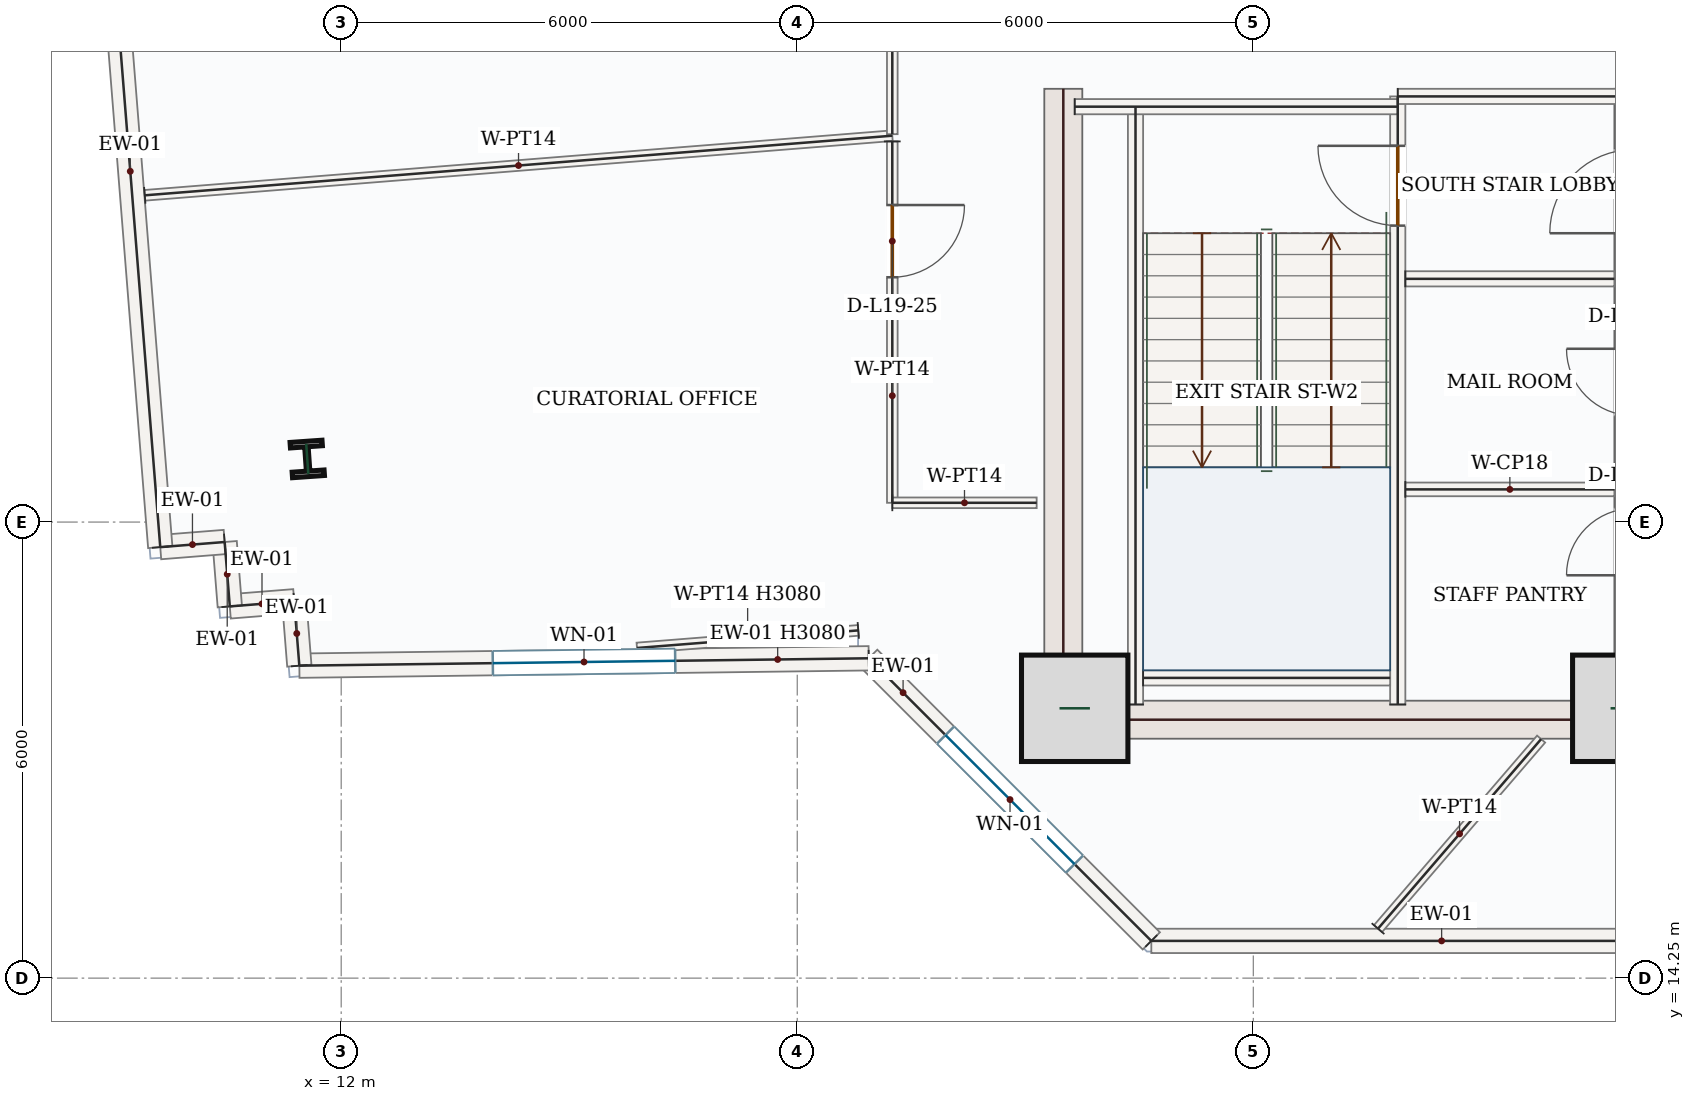
"""IFC4 building model, lengths in metres.
Left out: names, types, materials, properties, quantities, classifications, styles, units other than length and angle.
Written with IfcOpenShell. Run it as: python <this file> out.ifc"""

import sys

from ifc_helpers import new_model, si_unit, direction, frame, frame_2d, origin, origin_2d, place, context, subcontext, project, spatial, rectangle, i_section, extrude, source, transform, mapped, element, fill, save


model = new_model("IFC4")
c1 = context("Model", 3, precision=1e-05, world=origin(), true_north=direction((0.0, 1.0)))
c2 = subcontext(c1, "Body", "Model", "MODEL_VIEW")
j1 = project(units=[si_unit("LENGTHUNIT", "METRE"), si_unit("PLANEANGLEUNIT", "RADIAN")], contexts=[c1])
p1 = place(None, origin())
s1 = spatial("IfcSite", under=j1, at=p1, CompositionType="ELEMENT")
p2 = place(p1, origin())
s2 = spatial("IfcBuilding", under=s1, at=p2, CompositionType="ELEMENT")
p3 = place(p2, frame((0.0, 0.0, 87.9)))
s3 = spatial("IfcBuildingStorey", under=s2, at=p3, CompositionType="ELEMENT", Elevation=87.9)
m1 = source(origin(), c2, "Body", "SweptSolid", [
    extrude(rectangle(XDim=8.55, YDim=0.5, at=frame_2d((4.275, 0.0))), origin(), (0.0, 0.0, 1.0), 3.95),
])
p4 = place(p3, frame((21.5, 17.4, 0.0), z_axis=(0.0, 0.0, 1.0), x_axis=(0.0, 1.0, 0.0)))
e1 = element("IfcWall", 1, at=p4, inside=s3, PredefinedType="SHEAR", context=c2, shape_type="MappedRepresentation", body=[
    mapped(m1, transform((0.0, 0.0, 0.0), x_axis=(1.0, 0.0, 0.0), y_axis=(0.0, 1.0, 0.0), z_axis=(0.0, 0.0, 1.0), scale=1.0)),
])
p5 = place(p3, frame((29.0, 17.4, 0.0), z_axis=(0.0, 0.0, 1.0), x_axis=(0.0, 1.0, 0.0)))
e2 = element("IfcWall", 2, at=p5, inside=s3, PredefinedType="SHEAR", context=c2, shape_type="SweptSolid", body=[
    extrude(rectangle(XDim=8.55, YDim=0.5, at=frame_2d((4.275, 0.0))), origin(), (0.0, 0.0, 1.0), 3.95),
])
p6 = place(p5, frame((6.65, 0.0, 0.0)))
e3 = element("IfcOpeningElement", 3, at=p6, cuts=e2, PredefinedType="OPENING", context=c2, shape_type="SweptSolid", body=[
    extrude(rectangle(XDim=1.1, YDim=2.2, at=frame_2d((0.55, 1.1))), frame((0.0, 0.26, 0.0), z_axis=(0.0, -1.0, 0.0), x_axis=(1.0, 0.0, 0.0)), (0.0, 0.0, 1.0), 0.52),
])
p7 = place(p5, frame((2.15, 0.0, 0.0)))
e4 = element("IfcOpeningElement", 4, at=p7, cuts=e2, PredefinedType="OPENING", context=c2, shape_type="SweptSolid", body=[
    extrude(rectangle(XDim=0.88, YDim=2.1, at=frame_2d((0.44, 1.05))), frame((0.0, 0.26, 0.0), z_axis=(0.0, -1.0, 0.0), x_axis=(1.0, 0.0, 0.0)), (0.0, 0.0, 1.0), 0.52),
])
p8 = place(p5, frame((4.25, 0.0, 0.0)))
e5 = element("IfcOpeningElement", 5, at=p8, cuts=e2, PredefinedType="OPENING", context=c2, shape_type="SweptSolid", body=[
    extrude(rectangle(XDim=0.88, YDim=2.1, at=frame_2d((0.44, 1.05))), frame((0.0, 0.26, 0.0), z_axis=(0.0, -1.0, 0.0), x_axis=(1.0, 0.0, 0.0)), (0.0, 0.0, 1.0), 0.52),
])
m2 = source(origin(), c2, "Body", "SweptSolid", [
    extrude(rectangle(XDim=7.0, YDim=0.5, at=frame_2d((3.5, 0.0))), origin(), (0.0, 0.0, 1.0), 3.95),
])
p9 = place(p3, frame((21.75, 17.65, 0.0), z_axis=(0.0, 0.0, 1.0), x_axis=(1.0, 0.0, 0.0)))
e6 = element("IfcWall", 6, at=p9, inside=s3, PredefinedType="SHEAR", context=c2, shape_type="MappedRepresentation", body=[
    mapped(m2, transform((0.0, 0.0, 0.0), x_axis=(1.0, 0.0, 0.0), y_axis=(0.0, 1.0, 0.0), z_axis=(0.0, 0.0, 1.0), scale=1.0)),
])
m3 = source(origin(), c2, "Body", "SweptSolid", [
    extrude(rectangle(XDim=1.4, YDim=1.4, at=origin_2d()), origin(), (0.0, 0.0, 1.0), 4.2),
])
for number, where, z_axis, x_axis in (
    (7, (21.65, 17.8, 0.0), (0.0, 0.0, 1.0), (1.0, 0.0, 0.0)),
    (8, (28.9, 17.8, 0.0), (0.0, 0.0, 1.0), (1.0, 0.0, 0.0)),
):
    element("IfcColumn", number, at=place(p3, frame(where, z_axis=z_axis, x_axis=x_axis)), inside=s3, PredefinedType="COLUMN", context=c2, shape_type="MappedRepresentation", body=[
        mapped(m3, transform((0.0, 0.0, 0.0), x_axis=(1.0, 0.0, 0.0), y_axis=(0.0, 1.0, 0.0), z_axis=(0.0, 0.0, 1.0), scale=1.0)),
    ])
m4 = source(origin(), c2, "Body", "SweptSolid", [
    extrude(i_section(OverallWidth=0.421, OverallDepth=0.465, WebThickness=0.045, FlangeThickness=0.073, FilletRadius=0.018, at=origin_2d()), origin(), (0.0, 0.0, 1.0), 4.2),
])
p10 = place(p3, frame((11.553, 21.08, 0.0), z_axis=(0.0, 0.0, 1.0), x_axis=(0.99756405026, 0.069756473744, 0.0)))
e9 = element("IfcColumn", 9, at=p10, inside=s3, PredefinedType="COLUMN", context=c2, shape_type="MappedRepresentation", body=[
    mapped(m4, transform((0.0, 0.0, 0.0), x_axis=(1.0, 0.0, 0.0), y_axis=(0.0, 1.0, 0.0), z_axis=(0.0, 0.0, 1.0), scale=1.0)),
])
m5 = source(origin(), c2, "Body", "SweptSolid", [
    extrude(rectangle(XDim=7.639, YDim=0.32, at=frame_2d((3.819, 0.0))), origin(), (0.0, 0.0, 1.0), 3.95),
])
p11 = place(p3, frame((30.297, 14.74, 0.0), z_axis=(0.0, 0.0, 1.0), x_axis=(-1.0, 0.0, 0.0)))
e10 = element("IfcWall", 10, at=p11, inside=s3, PredefinedType="SOLIDWALL", context=c2, shape_type="MappedRepresentation", body=[
    mapped(m5, transform((0.0, 0.0, 0.0), x_axis=(1.0, 0.0, 0.0), y_axis=(0.0, 1.0, 0.0), z_axis=(0.0, 0.0, 1.0), scale=1.0)),
])
p12 = place(p3, frame((22.658, 14.74, 0.0), z_axis=(0.0, 0.0, 1.0), x_axis=(-0.707106781187, 0.707106781187, 0.0)))
e11 = element("IfcWall", 11, at=p12, inside=s3, PredefinedType="SOLIDWALL", context=c2, shape_type="SweptSolid", body=[
    extrude(rectangle(XDim=5.258, YDim=0.32, at=frame_2d((2.629, 0.0))), origin(), (0.0, 0.0, 1.0), 3.95),
])
p13 = place(p12, frame((1.429, 0.0, 0.85)))
e12 = element("IfcOpeningElement", 12, at=p13, cuts=e11, PredefinedType="OPENING", context=c2, shape_type="SweptSolid", body=[
    extrude(rectangle(XDim=2.4, YDim=1.8, at=frame_2d((1.2, 0.9))), frame((0.0, 0.17, 0.0), z_axis=(0.0, -1.0, 0.0), x_axis=(1.0, 0.0, 0.0)), (0.0, 0.0, 1.0), 0.34),
])
p14 = place(p3, frame((18.94, 18.458, 0.0), z_axis=(0.0, 0.0, 1.0), x_axis=(-0.999915877143, -0.012970683759, 0.0)))
e13 = element("IfcWall", 13, at=p14, inside=s3, PredefinedType="SOLIDWALL", context=c2, shape_type="SweptSolid", body=[
    extrude(rectangle(XDim=7.491, YDim=0.32, at=frame_2d((3.746, 0.0))), origin(), (0.0, 0.0, 1.0), 3.08),
])
p15 = place(p14, frame((2.546, 0.0, 0.85)))
e14 = element("IfcOpeningElement", 14, at=p15, cuts=e13, PredefinedType="OPENING", context=c2, shape_type="SweptSolid", body=[
    extrude(rectangle(XDim=2.4, YDim=1.8, at=frame_2d((1.2, 0.9))), frame((0.0, 0.17, 0.0), z_axis=(0.0, -1.0, 0.0), x_axis=(1.0, 0.0, 0.0)), (0.0, 0.0, 1.0), 0.34),
])
m6 = source(origin(), c2, "Body", "SweptSolid", [
    extrude(rectangle(XDim=0.85, YDim=0.32, at=frame_2d((0.425, 0.0))), origin(), (0.0, 0.0, 1.0), 3.95),
])
p16 = place(p3, frame((11.449, 18.361, 0.0), z_axis=(0.0, 0.0, 1.0), x_axis=(-0.079573954853, 0.996828965123, 0.0)))
e15 = element("IfcWall", 15, at=p16, inside=s3, PredefinedType="SOLIDWALL", context=c2, shape_type="MappedRepresentation", body=[
    mapped(m6, transform((0.0, 0.0, 0.0), x_axis=(1.0, 0.0, 0.0), y_axis=(0.0, 1.0, 0.0), z_axis=(0.0, 0.0, 1.0), scale=1.0)),
])
m7 = source(origin(), c2, "Body", "SweptSolid", [
    extrude(rectangle(XDim=0.85, YDim=0.32, at=frame_2d((0.425, 0.0))), origin(), (0.0, 0.0, 1.0), 3.95),
])
for number, where, z_axis, x_axis in (
    (16, (11.382, 19.208, 0.0), (0.0, 0.0, 1.0), (-0.997, -0.08, 0.0)),
    (17, (10.534, 19.14, 0.0), (0.0, 0.0, 1.0), (-0.08, 0.997, 0.0)),
):
    element("IfcWall", number, at=place(p3, frame(where, z_axis=z_axis, x_axis=x_axis)), inside=s3, PredefinedType="SOLIDWALL", context=c2, shape_type="MappedRepresentation", body=[
        mapped(m7, transform((0.0, 0.0, 0.0), x_axis=(1.0, 0.0, 0.0), y_axis=(0.0, 1.0, 0.0), z_axis=(0.0, 0.0, 1.0), scale=1.0)),
    ])
p17 = place(p3, frame((10.467, 19.988, 0.0), z_axis=(0.0, 0.0, 1.0), x_axis=(-0.996851711541, -0.079288493483, 0.0)))
e18 = element("IfcWall", 18, at=p17, inside=s3, PredefinedType="SOLIDWALL", context=c2, shape_type="MappedRepresentation", body=[
    mapped(m6, transform((0.0, 0.0, 0.0), x_axis=(1.0, 0.0, 0.0), y_axis=(0.0, 1.0, 0.0), z_axis=(0.0, 0.0, 1.0), scale=1.0)),
])
m8 = source(origin(), c2, "Body", "SweptSolid", [
    extrude(rectangle(XDim=9.92, YDim=0.32, at=frame_2d((4.96, 0.0))), origin(), (0.0, 0.0, 1.0), 3.95),
])
p18 = place(p3, frame((9.619, 19.92, 0.0), z_axis=(0.0, 0.0, 1.0), x_axis=(-0.07949480177, 0.996835280521, 0.0)))
e19 = element("IfcWall", 19, at=p18, inside=s3, PredefinedType="SOLIDWALL", context=c2, shape_type="MappedRepresentation", body=[
    mapped(m8, transform((0.0, 0.0, 0.0), x_axis=(1.0, 0.0, 0.0), y_axis=(0.0, 1.0, 0.0), z_axis=(0.0, 0.0, 1.0), scale=1.0)),
])
m9 = source(origin(), c2, "Body", "SweptSolid", [
    extrude(rectangle(XDim=7.87, YDim=0.2, at=frame_2d((3.935, 0.0))), origin(), (0.0, 0.0, 1.0), 3.95),
])
p19 = place(p3, frame((22.45, 17.85, 0.0), z_axis=(0.0, 0.0, 1.0), x_axis=(0.0, 1.0, 0.0)))
e20 = element("IfcWall", 20, at=p19, inside=s3, PredefinedType="SOLIDWALL", context=c2, shape_type="MappedRepresentation", body=[
    mapped(m9, transform((0.0, 0.0, 0.0), x_axis=(1.0, 0.0, 0.0), y_axis=(0.0, 1.0, 0.0), z_axis=(0.0, 0.0, 1.0), scale=1.0)),
])
p20 = place(p3, frame((25.9, 17.85, 0.0), z_axis=(0.0, 0.0, 1.0), x_axis=(0.0, 1.0, 0.0)))
e21 = element("IfcWall", 21, at=p20, inside=s3, PredefinedType="SOLIDWALL", context=c2, shape_type="SweptSolid", body=[
    extrude(rectangle(XDim=8.0, YDim=0.2, at=frame_2d((4.0, 0.0))), origin(), (0.0, 0.0, 1.0), 3.95),
])
p21 = place(p20, frame((6.3, 0.0, 0.0)))
e22 = element("IfcOpeningElement", 22, at=p21, cuts=e21, PredefinedType="OPENING", context=c2, shape_type="SweptSolid", body=[
    extrude(rectangle(XDim=1.05, YDim=2.15, at=frame_2d((0.525, 1.075))), frame((0.0, 0.11, 0.0), z_axis=(0.0, -1.0, 0.0), x_axis=(1.0, 0.0, 0.0)), (0.0, 0.0, 1.0), 0.22),
])
m10 = source(origin(), c2, "Body", "SweptSolid", [
    extrude(rectangle(XDim=4.25, YDim=0.2, at=frame_2d((2.125, 0.0))), origin(), (0.0, 0.0, 1.0), 3.95),
])
p22 = place(p3, frame((21.65, 25.715, 0.0), z_axis=(0.0, 0.0, 1.0), x_axis=(1.0, 0.0, 0.0)))
e23 = element("IfcWall", 23, at=p22, inside=s3, PredefinedType="SOLIDWALL", context=c2, shape_type="MappedRepresentation", body=[
    mapped(m10, transform((0.0, 0.0, 0.0), x_axis=(1.0, 0.0, 0.0), y_axis=(0.0, 1.0, 0.0), z_axis=(0.0, 0.0, 1.0), scale=1.0)),
])
m11 = source(origin(), c2, "Body", "SweptSolid", [
    extrude(rectangle(XDim=3.0, YDim=0.2, at=frame_2d((1.5, 0.0))), origin(), (0.0, 0.0, 1.0), 3.95),
])
p23 = place(p3, frame((25.9, 25.85, 0.0), z_axis=(0.0, 0.0, 1.0), x_axis=(1.0, 0.0, 0.0)))
e24 = element("IfcWall", 24, at=p23, inside=s3, PredefinedType="SOLIDWALL", context=c2, shape_type="MappedRepresentation", body=[
    mapped(m11, transform((0.0, 0.0, 0.0), x_axis=(1.0, 0.0, 0.0), y_axis=(0.0, 1.0, 0.0), z_axis=(0.0, 0.0, 1.0), scale=1.0)),
])
m12 = source(origin(), c2, "Body", "SweptSolid", [
    extrude(rectangle(XDim=3.25, YDim=0.2, at=frame_2d((1.625, 0.0))), origin(), (0.0, 0.0, 1.0), 3.95),
])
p24 = place(p3, frame((22.55, 18.2, 0.0), z_axis=(0.0, 0.0, 1.0), x_axis=(1.0, 0.0, 0.0)))
e25 = element("IfcWall", 25, at=p24, inside=s3, PredefinedType="SOLIDWALL", context=c2, shape_type="MappedRepresentation", body=[
    mapped(m12, transform((0.0, 0.0, 0.0), x_axis=(1.0, 0.0, 0.0), y_axis=(0.0, 1.0, 0.0), z_axis=(0.0, 0.0, 1.0), scale=1.0)),
])
m13 = source(origin(), c2, "Body", "SweptSolid", [
    extrude(rectangle(XDim=2.75, YDim=0.2, at=frame_2d((1.375, 0.0))), origin(), (0.0, 0.0, 1.0), 3.95),
])
p25 = place(p3, frame((26.0, 23.45, 0.0), z_axis=(0.0, 0.0, 1.0), x_axis=(1.0, 0.0, 0.0)))
e26 = element("IfcWall", 26, at=p25, inside=s3, PredefinedType="SOLIDWALL", context=c2, shape_type="MappedRepresentation", body=[
    mapped(m13, transform((0.0, 0.0, 0.0), x_axis=(1.0, 0.0, 0.0), y_axis=(0.0, 1.0, 0.0), z_axis=(0.0, 0.0, 1.0), scale=1.0)),
])
m14 = source(origin(), c2, "Body", "SweptSolid", [
    extrude(rectangle(XDim=2.75, YDim=0.18, at=frame_2d((1.375, 0.0))), origin(), (0.0, 0.0, 1.0), 3.95),
])
p26 = place(p3, frame((26.0, 20.68, 0.0), z_axis=(0.0, 0.0, 1.0), x_axis=(1.0, 0.0, 0.0)))
e27 = element("IfcWall", 27, at=p26, inside=s3, PredefinedType="PARTITIONING", context=c2, shape_type="MappedRepresentation", body=[
    mapped(m14, transform((0.0, 0.0, 0.0), x_axis=(1.0, 0.0, 0.0), y_axis=(0.0, 1.0, 0.0), z_axis=(0.0, 0.0, 1.0), scale=1.0)),
])
m15 = source(origin(), c2, "Body", "SweptSolid", [
    extrude(rectangle(XDim=3.29, YDim=0.14, at=frame_2d((1.645, 0.0))), origin(), (0.0, 0.0, 1.0), 3.95),
])
p27 = place(p3, frame((25.64, 14.901, 0.0), z_axis=(0.0, 0.0, 1.0), x_axis=(0.652214149627, 0.758034763732, 0.0)))
e28 = element("IfcWall", 28, at=p27, inside=s3, PredefinedType="PARTITIONING", context=c2, shape_type="MappedRepresentation", body=[
    mapped(m15, transform((0.0, 0.0, 0.0), x_axis=(1.0, 0.0, 0.0), y_axis=(0.0, 1.0, 0.0), z_axis=(0.0, 0.0, 1.0), scale=1.0)),
])
m16 = source(origin(), c2, "Body", "SweptSolid", [
    extrude(rectangle(XDim=2.921, YDim=0.14, at=frame_2d((1.46, 0.0))), origin(), (0.0, 0.0, 1.0), 3.08),
])
p28 = place(p3, frame((18.803, 18.825, 0.0), z_axis=(0.0, 0.0, 1.0), x_axis=(-0.996855023767, -0.079246839625, 0.0)))
e29 = element("IfcWall", 29, at=p28, inside=s3, PredefinedType="PARTITIONING", context=c2, shape_type="MappedRepresentation", body=[
    mapped(m16, transform((0.0, 0.0, 0.0), x_axis=(1.0, 0.0, 0.0), y_axis=(0.0, 1.0, 0.0), z_axis=(0.0, 0.0, 1.0), scale=1.0)),
])
m17 = source(origin(), c2, "Body", "SweptSolid", [
    extrude(rectangle(XDim=9.865, YDim=0.14, at=frame_2d((4.933, 0.0))), origin(), (0.0, 0.0, 1.0), 3.95),
])
p29 = place(p3, frame((9.416, 24.549, 0.0), z_axis=(0.0, 0.0, 1.0), x_axis=(0.996833900052, 0.079512110446, 0.0)))
e30 = element("IfcWall", 30, at=p29, inside=s3, PredefinedType="PARTITIONING", context=c2, shape_type="MappedRepresentation", body=[
    mapped(m17, transform((0.0, 0.0, 0.0), x_axis=(1.0, 0.0, 0.0), y_axis=(0.0, 1.0, 0.0), z_axis=(0.0, 0.0, 1.0), scale=1.0)),
])
p30 = place(p3, frame((19.25, 25.258, 0.0), z_axis=(0.0, 0.0, 1.0), x_axis=(0.000102701037, -0.999999994726, 0.0)))
e31 = element("IfcWall", 31, at=p30, inside=s3, PredefinedType="PARTITIONING", context=c2, shape_type="SweptSolid", body=[
    extrude(rectangle(XDim=4.754, YDim=0.14, at=frame_2d((2.377, 0.0))), origin(), (0.0, 0.0, 1.0), 3.95),
])
p31 = place(p30, frame((0.837, 0.0, 0.0)))
e32 = element("IfcOpeningElement", 32, at=p31, cuts=e31, PredefinedType="OPENING", context=c2, shape_type="SweptSolid", body=[
    extrude(rectangle(XDim=0.95, YDim=2.15, at=frame_2d((0.475, 1.075))), frame((0.0, 0.08, 0.0), z_axis=(0.0, -1.0, 0.0), x_axis=(1.0, 0.0, 0.0)), (0.0, 0.0, 1.0), 0.16),
])
m18 = source(origin(), c2, "Body", "SweptSolid", [
    extrude(rectangle(XDim=1.899, YDim=0.14, at=frame_2d((0.949, 0.0))), origin(), (0.0, 0.0, 1.0), 3.95),
])
p32 = place(p3, frame((19.25, 20.503, 0.0), z_axis=(0.0, 0.0, 1.0), x_axis=(0.999999991735, 0.000128567754, 0.0)))
e33 = element("IfcWall", 33, at=p32, inside=s3, PredefinedType="PARTITIONING", context=c2, shape_type="MappedRepresentation", body=[
    mapped(m18, transform((0.0, 0.0, 0.0), x_axis=(1.0, 0.0, 0.0), y_axis=(0.0, 1.0, 0.0), z_axis=(0.0, 0.0, 1.0), scale=1.0)),
])
p33 = place(p3, frame((19.253, 33.497, 0.0), z_axis=(0.0, 0.0, 1.0), x_axis=(-0.000329746078, -0.999999945634, 0.0)))
e34 = element("IfcWall", 34, at=p33, inside=s3, PredefinedType="PARTITIONING", context=c2, shape_type="SweptSolid", body=[
    extrude(rectangle(XDim=8.144, YDim=0.14, at=frame_2d((4.072, 0.0))), origin(), (0.0, 0.0, 1.0), 3.95),
])
p34 = place(p33, frame((5.611, 0.0, 0.0)))
e35 = element("IfcOpeningElement", 35, at=p34, cuts=e34, PredefinedType="OPENING", context=c2, shape_type="SweptSolid", body=[
    extrude(rectangle(XDim=0.95, YDim=2.15, at=frame_2d((0.475, 1.075))), frame((0.0, 0.08, 0.0), z_axis=(0.0, -1.0, 0.0), x_axis=(1.0, 0.0, 0.0)), (0.0, 0.0, 1.0), 0.16),
])
m19 = source(origin(), c2, "Body", "SweptSolid", [
    extrude(rectangle(XDim=2.4, YDim=1.8, at=frame_2d((1.2, 0.9))), frame((0.0, 0.03, 0.0), z_axis=(0.0, -1.0, 0.0), x_axis=(1.0, 0.0, 0.0)), (0.0, 0.0, 1.0), 0.06),
])
p35 = place(p13, origin())
e36 = element("IfcWindow", 36, at=p35, inside=s3, PartitioningType="DOUBLE_PANEL_VERTICAL", PredefinedType="WINDOW", context=c2, shape_type="MappedRepresentation", body=[
    mapped(m19, transform((0.0, 0.0, 0.0), x_axis=(1.0, 0.0, 0.0), y_axis=(0.0, 1.0, 0.0), z_axis=(0.0, 0.0, 1.0), scale=1.0)),
])
fill(e12, e36)
p36 = place(p15, origin())
e37 = element("IfcWindow", 37, at=p36, inside=s3, PartitioningType="DOUBLE_PANEL_VERTICAL", PredefinedType="WINDOW", context=c2, shape_type="MappedRepresentation", body=[
    mapped(m19, transform((0.0, 0.0, 0.0), x_axis=(1.0, 0.0, 0.0), y_axis=(0.0, 1.0, 0.0), z_axis=(0.0, 0.0, 1.0), scale=1.0)),
])
fill(e14, e37)
m20 = source(origin(), c2, "Body", "SweptSolid", [
    extrude(rectangle(XDim=1.05, YDim=2.15, at=frame_2d((0.525, 1.075))), frame((0.0, 0.025, 0.0), z_axis=(0.0, -1.0, 0.0), x_axis=(1.0, 0.0, 0.0)), (0.0, 0.0, 1.0), 0.05),
])
p37 = place(p21, origin())
e38 = element("IfcDoor", 38, at=p37, inside=s3, OperationType="SINGLE_SWING_RIGHT", PredefinedType="DOOR", context=c2, shape_type="MappedRepresentation", body=[
    mapped(m20, transform((0.0, 0.0, 0.0), x_axis=(1.0, 0.0, 0.0), y_axis=(0.0, 1.0, 0.0), z_axis=(0.0, 0.0, 1.0), scale=1.0)),
])
fill(e22, e38)
m21 = source(origin(), c2, "Body", "SweptSolid", [
    extrude(rectangle(XDim=0.95, YDim=2.15, at=frame_2d((0.475, 1.075))), frame((0.0, 0.025, 0.0), z_axis=(0.0, -1.0, 0.0), x_axis=(1.0, 0.0, 0.0)), (0.0, 0.0, 1.0), 0.05),
])
p38 = place(p31, origin())
e39 = element("IfcDoor", 39, at=p38, inside=s3, OperationType="SINGLE_SWING_LEFT", PredefinedType="DOOR", context=c2, shape_type="MappedRepresentation", body=[
    mapped(m21, transform((0.0, 0.0, 0.0), x_axis=(1.0, 0.0, 0.0), y_axis=(0.0, 1.0, 0.0), z_axis=(0.0, 0.0, 1.0), scale=1.0)),
])
fill(e32, e39)
save(model, sys.argv[1])
